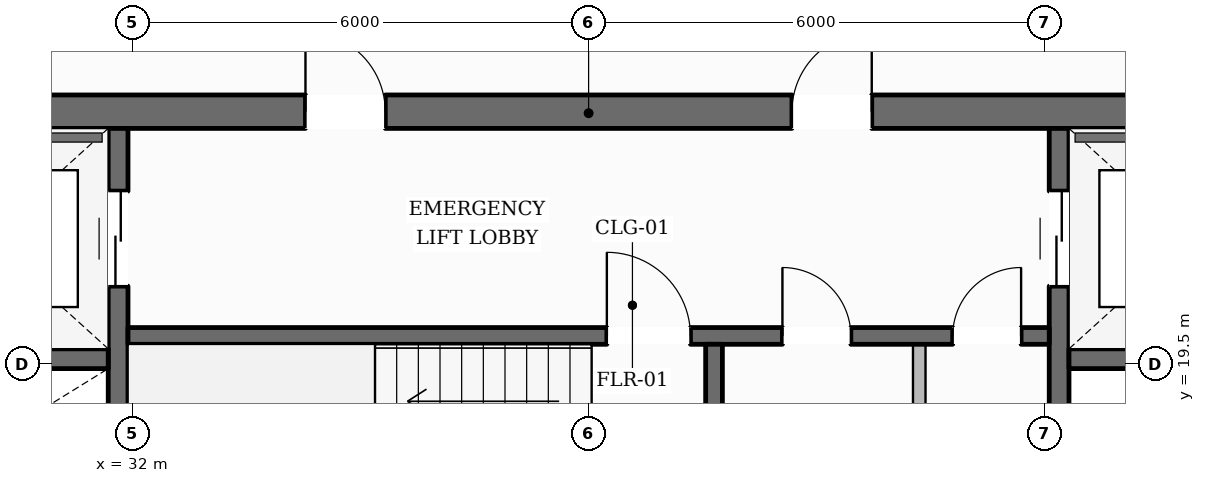
"""IFC4 building model, lengths in metres.
Left out: names, types, materials, properties, quantities, classifications, styles, units other than length and angle.
Written with IfcOpenShell. Run it as: python <this file> out.ifc"""

import sys

from ifc_helpers import new_model, si_unit, direction, frame, frame_2d, origin, place, context, subcontext, project, spatial, rectangle, extrude, element, fill, save


model = new_model("IFC4")
c1 = context("Model", 3, precision=1e-05, world=origin(), true_north=direction((0.0, 1.0)))
c2 = subcontext(c1, "Body", "Model", "MODEL_VIEW")
j1 = project(units=[si_unit("LENGTHUNIT", "METRE"), si_unit("PLANEANGLEUNIT", "RADIAN")], contexts=[c1])
p1 = place(None, origin())
s1 = spatial("IfcSite", under=j1, at=p1, CompositionType="ELEMENT")
p2 = place(p1, origin())
s2 = spatial("IfcBuilding", under=s1, at=p2, CompositionType="ELEMENT")
p3 = place(p2, frame((0.0, 0.0, 180.4)))
s3 = spatial("IfcBuildingStorey", under=s2, at=p3, CompositionType="ELEMENT", Elevation=180.4)
p4 = place(p3, frame((28.04, 22.82, 0.0), z_axis=(0.0, 0.0, 1.0), x_axis=(1.0, 0.0, 0.0)))
e1 = element("IfcWall", 1, at=p4, inside=s3, PredefinedType="SOLIDWALL", context=c2, shape_type="SweptSolid", body=[
    extrude(rectangle(XDim=19.92, YDim=0.44, at=frame_2d((9.96, 0.0))), origin(), (0.0, 0.0, 1.0), 3.6),
])
p5 = place(p4, frame((6.235, 0.0, 0.0)))
e2 = element("IfcOpeningElement", 2, at=p5, cuts=e1, PredefinedType="OPENING", context=c2, shape_type="SweptSolid", body=[
    extrude(rectangle(XDim=1.05, YDim=2.15, at=frame_2d((0.525, 1.075))), frame((0.0, 0.23, 0.0), z_axis=(0.0, -1.0, 0.0), x_axis=(1.0, 0.0, 0.0)), (0.0, 0.0, 1.0), 0.46),
])
p6 = place(p4, frame((12.635, 0.0, 0.0)))
e3 = element("IfcOpeningElement", 3, at=p6, cuts=e1, PredefinedType="OPENING", context=c2, shape_type="SweptSolid", body=[
    extrude(rectangle(XDim=1.05, YDim=2.15, at=frame_2d((0.525, 1.075))), frame((0.0, 0.23, 0.0), z_axis=(0.0, -1.0, 0.0), x_axis=(1.0, 0.0, 0.0)), (0.0, 0.0, 1.0), 0.46),
])
p7 = place(p3, frame((31.81, 9.6, 0.0), z_axis=(0.0, 0.0, 1.0), x_axis=(0.0, 1.0, 0.0)))
e4 = element("IfcWall", 4, at=p7, inside=s3, PredefinedType="SHEAR", context=c2, shape_type="SweptSolid", body=[
    extrude(rectangle(XDim=13.0, YDim=0.26, at=frame_2d((6.5, 0.0))), origin(), (0.0, 0.0, 1.0), 3.6),
])
p8 = place(p7, frame((10.925, 0.0, 0.0)))
e5 = element("IfcOpeningElement", 5, at=p8, cuts=e4, PredefinedType="OPENING", context=c2, shape_type="SweptSolid", body=[
    extrude(rectangle(XDim=1.25, YDim=2.25, at=frame_2d((0.625, 1.125))), frame((0.0, 0.14, 0.0), z_axis=(0.0, -1.0, 0.0), x_axis=(1.0, 0.0, 0.0)), (0.0, 0.0, 1.0), 0.28),
])
p9 = place(p3, frame((44.19, 9.6, 0.0), z_axis=(0.0, 0.0, 1.0), x_axis=(0.0, 1.0, 0.0)))
e6 = element("IfcWall", 6, at=p9, inside=s3, PredefinedType="SHEAR", context=c2, shape_type="SweptSolid", body=[
    extrude(rectangle(XDim=13.0, YDim=0.26, at=frame_2d((6.5, 0.0))), origin(), (0.0, 0.0, 1.0), 3.6),
])
p10 = place(p9, frame((10.925, 0.0, 0.0)))
e7 = element("IfcOpeningElement", 7, at=p10, cuts=e6, PredefinedType="OPENING", context=c2, shape_type="SweptSolid", body=[
    extrude(rectangle(XDim=1.25, YDim=2.25, at=frame_2d((0.625, 1.125))), frame((0.0, 0.14, 0.0), z_axis=(0.0, -1.0, 0.0), x_axis=(1.0, 0.0, 0.0)), (0.0, 0.0, 1.0), 0.28),
])
for number, where, z_axis, x_axis in (
    (8, (28.48, 19.57, 0.0), (0.0, 0.0, 1.0), (1.0, 0.0, 0.0)),
    (9, (44.32, 19.57, 0.0), (0.0, 0.0, 1.0), (1.0, 0.0, 0.0)),
):
    element("IfcWall", number, at=place(p3, frame(where, z_axis=z_axis, x_axis=x_axis)), inside=s3, PredefinedType="SHEAR", context=c2, shape_type="SweptSolid", body=[
        extrude(rectangle(XDim=3.2, YDim=0.26, at=frame_2d((1.6, 0.0))), origin(), (0.0, 0.0, 1.0), 3.6),
    ])
p11 = place(p3, frame((31.94, 19.87, 0.0), z_axis=(0.0, 0.0, 1.0), x_axis=(1.0, 0.0, 0.0)))
e10 = element("IfcWall", 10, at=p11, inside=s3, PredefinedType="SOLIDWALL", context=c2, shape_type="SweptSolid", body=[
    extrude(rectangle(XDim=12.12, YDim=0.22, at=frame_2d((6.06, 0.0))), origin(), (0.0, 0.0, 1.0), 3.6),
])
p12 = place(p11, frame((6.3, 0.0, 0.0)))
e11 = element("IfcOpeningElement", 11, at=p12, cuts=e10, PredefinedType="OPENING", context=c2, shape_type="SweptSolid", body=[
    extrude(rectangle(XDim=1.1, YDim=2.15, at=frame_2d((0.55, 1.075))), frame((0.0, 0.12, 0.0), z_axis=(0.0, -1.0, 0.0), x_axis=(1.0, 0.0, 0.0)), (0.0, 0.0, 1.0), 0.24),
])
p13 = place(p11, frame((8.61, 0.0, 0.0)))
e12 = element("IfcOpeningElement", 12, at=p13, cuts=e10, PredefinedType="OPENING", context=c2, shape_type="SweptSolid", body=[
    extrude(rectangle(XDim=0.9, YDim=2.1, at=frame_2d((0.45, 1.05))), frame((0.0, 0.12, 0.0), z_axis=(0.0, -1.0, 0.0), x_axis=(1.0, 0.0, 0.0)), (0.0, 0.0, 1.0), 0.24),
])
p14 = place(p11, frame((10.85, 0.0, 0.0)))
e13 = element("IfcOpeningElement", 13, at=p14, cuts=e10, PredefinedType="OPENING", context=c2, shape_type="SweptSolid", body=[
    extrude(rectangle(XDim=0.9, YDim=2.1, at=frame_2d((0.45, 1.05))), frame((0.0, 0.12, 0.0), z_axis=(0.0, -1.0, 0.0), x_axis=(1.0, 0.0, 0.0)), (0.0, 0.0, 1.0), 0.24),
])
p15 = place(p3, frame((39.65, 16.56, 0.0), z_axis=(0.0, 0.0, 1.0), x_axis=(0.0, 1.0, 0.0)))
e14 = element("IfcWall", 14, at=p15, inside=s3, PredefinedType="SOLIDWALL", context=c2, shape_type="SweptSolid", body=[
    extrude(rectangle(XDim=3.2, YDim=0.22, at=frame_2d((1.6, 0.0))), origin(), (0.0, 0.0, 1.0), 3.6),
])
p16 = place(p3, frame((15.064, 11.953, 0.0), z_axis=(0.0, 0.0, 1.0), x_axis=(0.495993114815, 0.86832645362, 0.0)))
e15 = element("IfcWall", 15, at=p16, inside=s3, PredefinedType="STANDARD", context=c2, shape_type="SweptSolid", body=[
    extrude(rectangle(XDim=37.324, YDim=0.35, at=frame_2d((18.662, 0.0))), origin(), (0.0, 0.0, 1.0), 3.132),
])
p17 = place(p16, frame((33.087, 0.0, 0.65)))
e16 = element("IfcOpeningElement", 16, at=p17, cuts=e15, PredefinedType="OPENING", context=c2, shape_type="SweptSolid", body=[
    extrude(rectangle(XDim=1.45, YDim=1.75, at=frame_2d((0.725, 0.875))), frame((0.0, 0.185, 0.0), z_axis=(0.0, -1.0, 0.0), x_axis=(1.0, 0.0, 0.0)), (0.0, 0.0, 1.0), 0.37),
])
p18 = place(p16, frame((27.026, 0.0, 0.65)))
e17 = element("IfcOpeningElement", 17, at=p18, cuts=e15, PredefinedType="OPENING", context=c2, shape_type="SweptSolid", body=[
    extrude(rectangle(XDim=1.45, YDim=1.75, at=frame_2d((0.725, 0.875))), frame((0.0, 0.185, 0.0), z_axis=(0.0, -1.0, 0.0), x_axis=(1.0, 0.0, 0.0)), (0.0, 0.0, 1.0), 0.37),
])
p19 = place(p16, frame((14.904, 0.0, 0.65)))
e18 = element("IfcOpeningElement", 18, at=p19, cuts=e15, PredefinedType="OPENING", context=c2, shape_type="SweptSolid", body=[
    extrude(rectangle(XDim=1.45, YDim=1.75, at=frame_2d((0.725, 0.875))), frame((0.0, 0.185, 0.0), z_axis=(0.0, -1.0, 0.0), x_axis=(1.0, 0.0, 0.0)), (0.0, 0.0, 1.0), 0.37),
])
p20 = place(p16, frame((8.844, 0.0, 0.65)))
e19 = element("IfcOpeningElement", 19, at=p20, cuts=e15, PredefinedType="OPENING", context=c2, shape_type="SweptSolid", body=[
    extrude(rectangle(XDim=1.45, YDim=1.75, at=frame_2d((0.725, 0.875))), frame((0.0, 0.185, 0.0), z_axis=(0.0, -1.0, 0.0), x_axis=(1.0, 0.0, 0.0)), (0.0, 0.0, 1.0), 0.37),
])
p21 = place(p16, frame((2.782, 0.0, 0.65)))
e20 = element("IfcOpeningElement", 20, at=p21, cuts=e15, PredefinedType="OPENING", context=c2, shape_type="SweptSolid", body=[
    extrude(rectangle(XDim=1.45, YDim=1.75, at=frame_2d((0.725, 0.875))), frame((0.0, 0.185, 0.0), z_axis=(0.0, -1.0, 0.0), x_axis=(1.0, 0.0, 0.0)), (0.0, 0.0, 1.0), 0.37),
])
p22 = place(p3, frame((42.575, 44.272, 0.0), z_axis=(0.0, 0.0, 1.0), x_axis=(0.503934681705, -0.863741764982, 0.0)))
e21 = element("IfcWall", 21, at=p22, inside=s3, PredefinedType="STANDARD", context=c2, shape_type="SweptSolid", body=[
    extrude(rectangle(XDim=37.915, YDim=0.35, at=frame_2d((18.958, 0.0))), origin(), (0.0, 0.0, 1.0), 3.132),
])
p23 = place(p22, frame((33.633, 0.0, 0.65)))
e22 = element("IfcOpeningElement", 22, at=p23, cuts=e21, PredefinedType="OPENING", context=c2, shape_type="SweptSolid", body=[
    extrude(rectangle(XDim=1.45, YDim=1.75, at=frame_2d((0.725, 0.875))), frame((0.0, 0.185, 0.0), z_axis=(0.0, -1.0, 0.0), x_axis=(1.0, 0.0, 0.0)), (0.0, 0.0, 1.0), 0.37),
])
p24 = place(p22, frame((27.472, 0.0, 0.65)))
e23 = element("IfcOpeningElement", 23, at=p24, cuts=e21, PredefinedType="OPENING", context=c2, shape_type="SweptSolid", body=[
    extrude(rectangle(XDim=1.45, YDim=1.75, at=frame_2d((0.725, 0.875))), frame((0.0, 0.185, 0.0), z_axis=(0.0, -1.0, 0.0), x_axis=(1.0, 0.0, 0.0)), (0.0, 0.0, 1.0), 0.37),
])
p25 = place(p22, frame((15.15, 0.0, 0.65)))
e24 = element("IfcOpeningElement", 24, at=p25, cuts=e21, PredefinedType="OPENING", context=c2, shape_type="SweptSolid", body=[
    extrude(rectangle(XDim=1.45, YDim=1.75, at=frame_2d((0.725, 0.875))), frame((0.0, 0.185, 0.0), z_axis=(0.0, -1.0, 0.0), x_axis=(1.0, 0.0, 0.0)), (0.0, 0.0, 1.0), 0.37),
])
p26 = place(p22, frame((8.989, 0.0, 0.65)))
e25 = element("IfcOpeningElement", 25, at=p26, cuts=e21, PredefinedType="OPENING", context=c2, shape_type="SweptSolid", body=[
    extrude(rectangle(XDim=1.45, YDim=1.75, at=frame_2d((0.725, 0.875))), frame((0.0, 0.185, 0.0), z_axis=(0.0, -1.0, 0.0), x_axis=(1.0, 0.0, 0.0)), (0.0, 0.0, 1.0), 0.37),
])
p27 = place(p22, frame((2.828, 0.0, 0.65)))
e26 = element("IfcOpeningElement", 26, at=p27, cuts=e21, PredefinedType="OPENING", context=c2, shape_type="SweptSolid", body=[
    extrude(rectangle(XDim=1.45, YDim=1.75, at=frame_2d((0.725, 0.875))), frame((0.0, 0.185, 0.0), z_axis=(0.0, -1.0, 0.0), x_axis=(1.0, 0.0, 0.0)), (0.0, 0.0, 1.0), 0.37),
])
p28 = place(p3, frame((42.35, 16.56, 0.0), z_axis=(0.0, 0.0, 1.0), x_axis=(0.0, 1.0, 0.0)))
e27 = element("IfcWall", 27, at=p28, inside=s3, PredefinedType="PARTITIONING", context=c2, shape_type="SweptSolid", body=[
    extrude(rectangle(XDim=3.2, YDim=0.165, at=frame_2d((1.6, 0.0))), origin(), (0.0, 0.0, 1.0), 3.6),
])
p29 = place(p12, origin())
e28 = element("IfcDoor", 28, at=p29, inside=s3, OperationType="SINGLE_SWING_LEFT", PredefinedType="DOOR", context=c2, shape_type="SweptSolid", body=[
    extrude(rectangle(XDim=1.1, YDim=2.15, at=frame_2d((0.55, 1.075))), frame((0.0, 0.025, 0.0), z_axis=(0.0, -1.0, 0.0), x_axis=(1.0, 0.0, 0.0)), (0.0, 0.0, 1.0), 0.05),
])
fill(e11, e28)
p30 = place(p5, origin())
e29 = element("IfcDoor", 29, at=p30, inside=s3, OperationType="SINGLE_SWING_LEFT", PredefinedType="DOOR", context=c2, shape_type="SweptSolid", body=[
    extrude(rectangle(XDim=1.05, YDim=2.15, at=frame_2d((0.525, 1.075))), frame((0.0, 0.025, 0.0), z_axis=(0.0, -1.0, 0.0), x_axis=(1.0, 0.0, 0.0)), (0.0, 0.0, 1.0), 0.05),
])
fill(e2, e29)
p31 = place(p6, origin())
e30 = element("IfcDoor", 30, at=p31, inside=s3, OperationType="SINGLE_SWING_RIGHT", PredefinedType="DOOR", context=c2, shape_type="SweptSolid", body=[
    extrude(rectangle(XDim=1.05, YDim=2.15, at=frame_2d((0.525, 1.075))), frame((0.0, 0.025, 0.0), z_axis=(0.0, -1.0, 0.0), x_axis=(1.0, 0.0, 0.0)), (0.0, 0.0, 1.0), 0.05),
])
fill(e3, e30)
p32 = place(p8, origin())
e31 = element("IfcDoor", 31, at=p32, inside=s3, OperationType="DOUBLE_DOOR_SLIDING", PredefinedType="DOOR", context=c2, shape_type="SweptSolid", body=[
    extrude(rectangle(XDim=1.25, YDim=2.25, at=frame_2d((0.625, 1.125))), frame((0.0, 0.025, 0.0), z_axis=(0.0, -1.0, 0.0), x_axis=(1.0, 0.0, 0.0)), (0.0, 0.0, 1.0), 0.05),
])
fill(e5, e31)
p33 = place(p10, origin())
e32 = element("IfcDoor", 32, at=p33, inside=s3, OperationType="DOUBLE_DOOR_SLIDING", PredefinedType="DOOR", context=c2, shape_type="SweptSolid", body=[
    extrude(rectangle(XDim=1.25, YDim=2.25, at=frame_2d((0.625, 1.125))), frame((0.0, 0.025, 0.0), z_axis=(0.0, -1.0, 0.0), x_axis=(1.0, 0.0, 0.0)), (0.0, 0.0, 1.0), 0.05),
])
fill(e7, e32)
p34 = place(p13, origin())
e33 = element("IfcDoor", 33, at=p34, inside=s3, OperationType="SINGLE_SWING_LEFT", PredefinedType="DOOR", context=c2, shape_type="SweptSolid", body=[
    extrude(rectangle(XDim=0.9, YDim=2.1, at=frame_2d((0.45, 1.05))), frame((0.0, 0.025, 0.0), z_axis=(0.0, -1.0, 0.0), x_axis=(1.0, 0.0, 0.0)), (0.0, 0.0, 1.0), 0.05),
])
fill(e12, e33)
p35 = place(p14, origin())
e34 = element("IfcDoor", 34, at=p35, inside=s3, OperationType="SINGLE_SWING_RIGHT", PredefinedType="DOOR", context=c2, shape_type="SweptSolid", body=[
    extrude(rectangle(XDim=0.9, YDim=2.1, at=frame_2d((0.45, 1.05))), frame((0.0, 0.025, 0.0), z_axis=(0.0, -1.0, 0.0), x_axis=(1.0, 0.0, 0.0)), (0.0, 0.0, 1.0), 0.05),
])
fill(e13, e34)
save(model, sys.argv[1])
